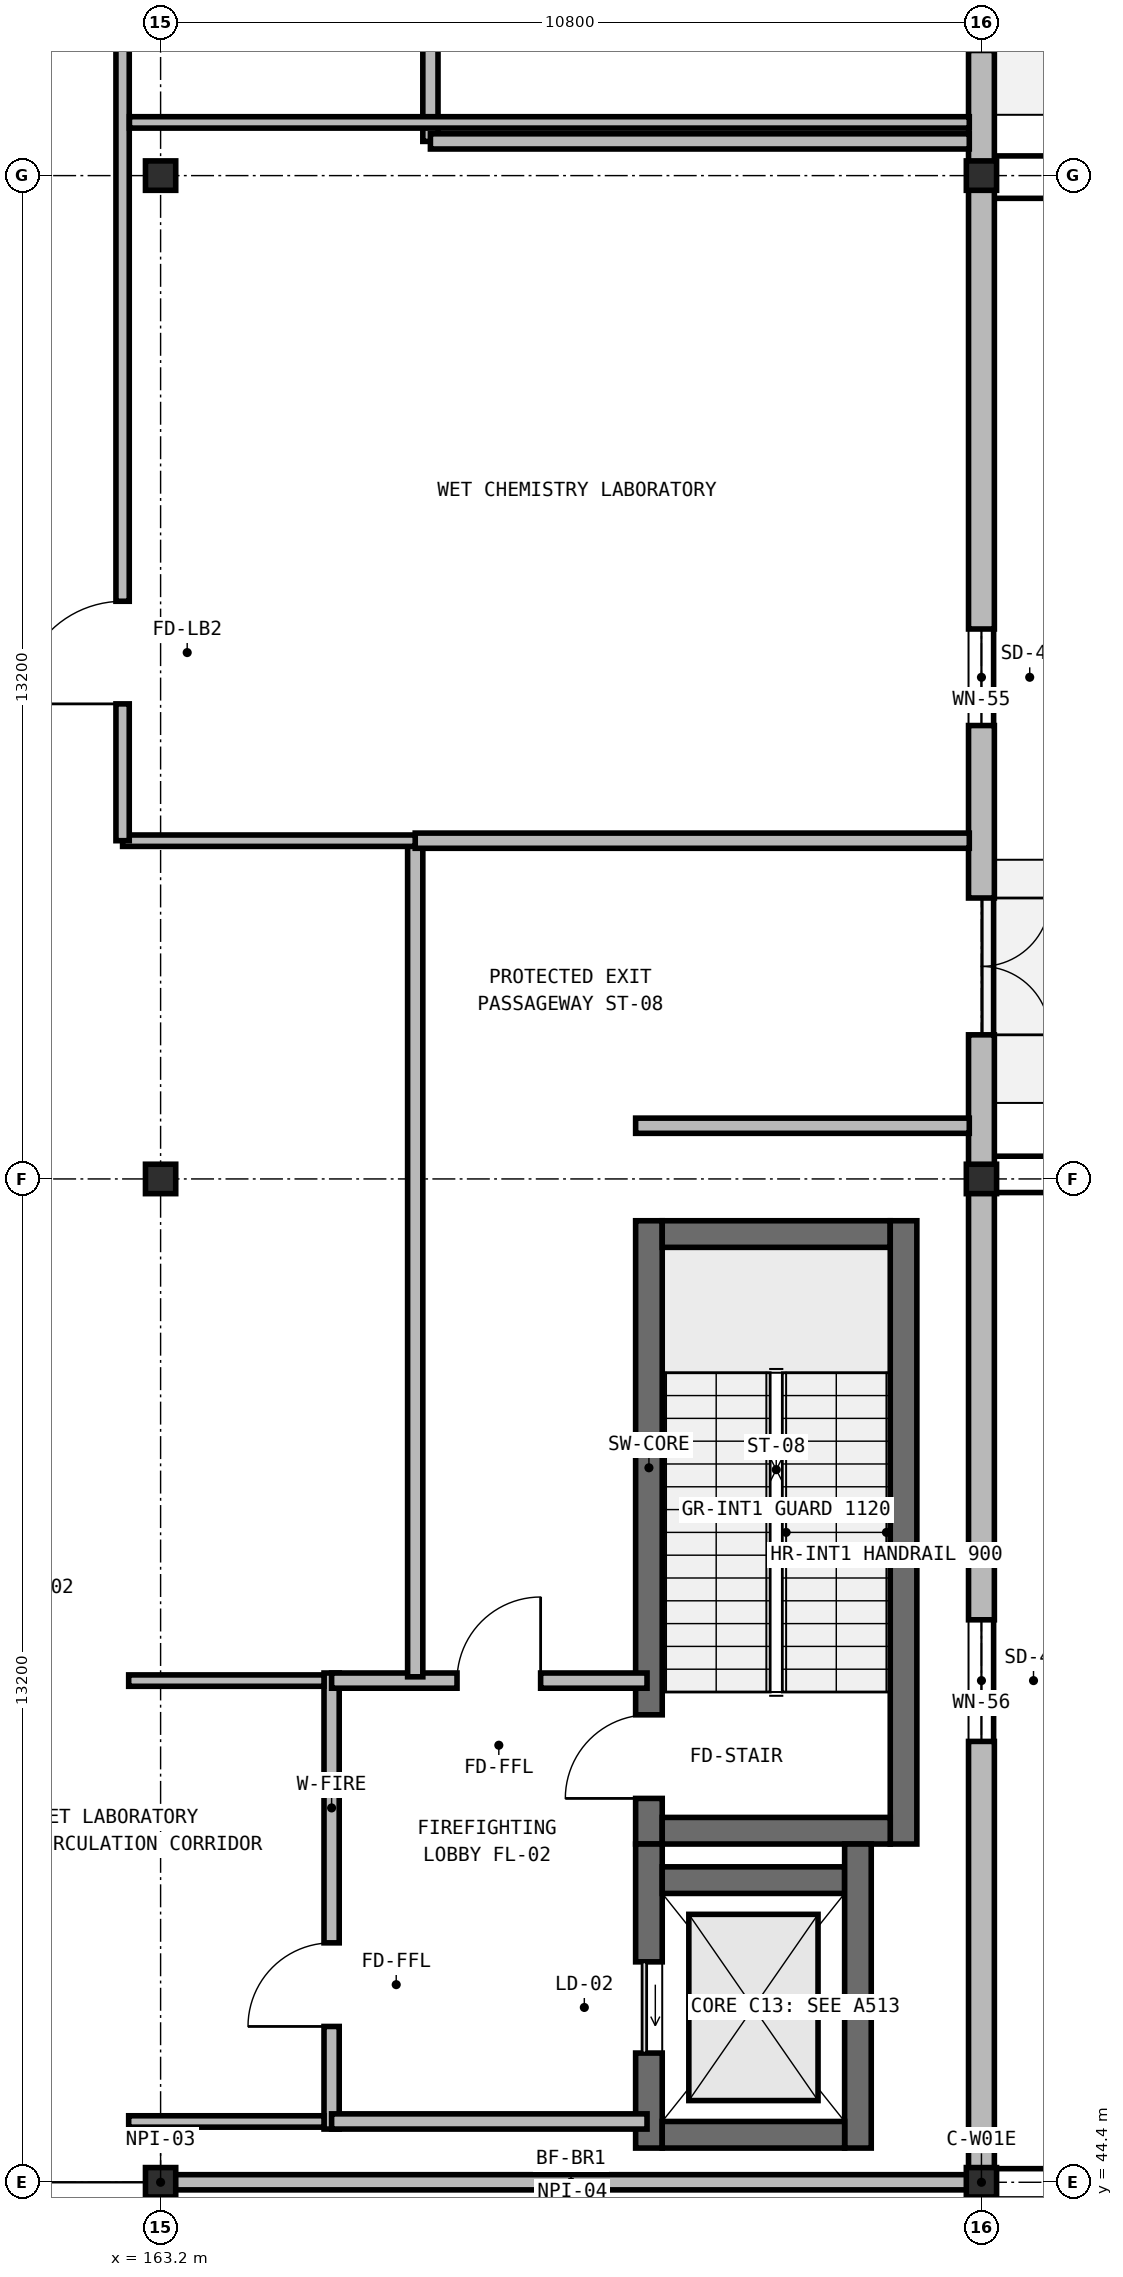
"""IFC4 building model, lengths in metres.
Left out: names, types, materials, properties, quantities, classifications, styles, units other than length and angle.
Written with IfcOpenShell. Run it as: python <this file> out.ifc"""

import sys

from ifc_helpers import new_model, si_unit, direction, frame, frame_2d, origin, origin_2d, place, context, subcontext, project, spatial, rectangle, i_section, extrude, element, fill, save


model = new_model("IFC4")
c1 = context("Model", 3, precision=1e-05, world=origin(), true_north=direction((0.0, 1.0)))
c2 = subcontext(c1, "Body", "Model", "MODEL_VIEW")
j1 = project(units=[si_unit("LENGTHUNIT", "METRE"), si_unit("PLANEANGLEUNIT", "RADIAN")], contexts=[c1])
p1 = place(None, origin())
s1 = spatial("IfcSite", under=j1, at=p1, CompositionType="ELEMENT")
p2 = place(p1, origin())
s2 = spatial("IfcBuilding", under=s1, at=p2, CompositionType="ELEMENT")
p3 = place(p2, origin())
s3 = spatial("IfcBuildingStorey", under=s2, at=p3, CompositionType="ELEMENT", Elevation=0.0)
p4 = place(p3, frame((169.625, 48.85, 0.0), z_axis=(0.0, 0.0, 1.0), x_axis=(0.0, 1.0, 0.0)))
e1 = element("IfcWall", 1, at=p4, inside=s3, PredefinedType="SHEAR", context=c2, shape_type="SweptSolid", body=[
    extrude(rectangle(XDim=8.2, YDim=0.35, at=frame_2d((4.1, 0.0))), origin(), (0.0, 0.0, 1.0), 5.25),
])
p5 = place(p4, frame((0.6, 0.0, 0.0)))
e2 = element("IfcOpeningElement", 2, at=p5, cuts=e1, PredefinedType="OPENING", context=c2, shape_type="SweptSolid", body=[
    extrude(rectangle(XDim=1.1, YDim=2.15, at=frame_2d((0.55, 1.075))), frame((0.0, 0.185, 0.0), z_axis=(0.0, -1.0, 0.0), x_axis=(1.0, 0.0, 0.0)), (0.0, 0.0, 1.0), 0.37),
])
p6 = place(p3, frame((169.8, 56.875, 0.0), z_axis=(0.0, 0.0, 1.0), x_axis=(1.0, 0.0, 0.0)))
e3 = element("IfcWall", 3, at=p6, inside=s3, PredefinedType="SHEAR", context=c2, shape_type="SweptSolid", body=[
    extrude(rectangle(XDim=3.0, YDim=0.35, at=frame_2d((1.5, 0.0))), origin(), (0.0, 0.0, 1.0), 5.25),
])
p7 = place(p3, frame((172.975, 57.05, 0.0), z_axis=(0.0, 0.0, 1.0), x_axis=(0.0, -1.0, 0.0)))
e4 = element("IfcWall", 4, at=p7, inside=s3, PredefinedType="SHEAR", context=c2, shape_type="SweptSolid", body=[
    extrude(rectangle(XDim=8.2, YDim=0.35, at=frame_2d((4.1, 0.0))), origin(), (0.0, 0.0, 1.0), 5.25),
])
p8 = place(p3, frame((172.8, 49.025, 0.0), z_axis=(0.0, 0.0, 1.0), x_axis=(-1.0, 0.0, 0.0)))
e5 = element("IfcWall", 5, at=p8, inside=s3, PredefinedType="SHEAR", context=c2, shape_type="SweptSolid", body=[
    extrude(rectangle(XDim=3.0, YDim=0.35, at=frame_2d((1.5, 0.0))), origin(), (0.0, 0.0, 1.0), 5.25),
])
p9 = place(p3, frame((169.625, 44.85, 0.0), z_axis=(0.0, 0.0, 1.0), x_axis=(0.0, 1.0, 0.0)))
e6 = element("IfcWall", 6, at=p9, inside=s3, PredefinedType="SHEAR", context=c2, shape_type="SweptSolid", body=[
    extrude(rectangle(XDim=4.0, YDim=0.35, at=frame_2d((2.0, 0.0))), origin(), (0.0, 0.0, 1.0), 5.25),
])
p10 = place(p9, frame((1.25, 0.0, 0.0)))
e7 = element("IfcOpeningElement", 7, at=p10, cuts=e6, PredefinedType="OPENING", context=c2, shape_type="SweptSolid", body=[
    extrude(rectangle(XDim=1.2, YDim=2.15, at=frame_2d((0.6, 1.075))), frame((0.0, 0.185, 0.0), z_axis=(0.0, -1.0, 0.0), x_axis=(1.0, 0.0, 0.0)), (0.0, 0.0, 1.0), 0.37),
])
p11 = place(p3, frame((169.8, 48.375, 0.0), z_axis=(0.0, 0.0, 1.0), x_axis=(1.0, 0.0, 0.0)))
e8 = element("IfcWall", 8, at=p11, inside=s3, PredefinedType="SHEAR", context=c2, shape_type="SweptSolid", body=[
    extrude(rectangle(XDim=2.4, YDim=0.35, at=frame_2d((1.2, 0.0))), origin(), (0.0, 0.0, 1.0), 5.25),
])
p12 = place(p3, frame((172.375, 48.85, 0.0), z_axis=(0.0, 0.0, 1.0), x_axis=(0.0, -1.0, 0.0)))
e9 = element("IfcWall", 9, at=p12, inside=s3, PredefinedType="SHEAR", context=c2, shape_type="SweptSolid", body=[
    extrude(rectangle(XDim=4.0, YDim=0.35, at=frame_2d((2.0, 0.0))), origin(), (0.0, 0.0, 1.0), 5.25),
])
p13 = place(p3, frame((172.2, 45.025, 0.0), z_axis=(0.0, 0.0, 1.0), x_axis=(-1.0, 0.0, 0.0)))
e10 = element("IfcWall", 10, at=p13, inside=s3, PredefinedType="SHEAR", context=c2, shape_type="SweptSolid", body=[
    extrude(rectangle(XDim=2.4, YDim=0.35, at=frame_2d((1.2, 0.0))), origin(), (0.0, 0.0, 1.0), 5.25),
])
for number, where, z_axis, x_axis in (
    (11, (163.2, 44.4, 0.0), (0.0, 0.0, 1.0), (1.0, 0.0, 0.0)),
    (12, (163.2, 57.6, 0.0), (0.0, 0.0, 1.0), (1.0, 0.0, 0.0)),
    (13, (163.2, 70.8, 0.0), (0.0, 0.0, 1.0), (1.0, 0.0, 0.0)),
    (14, (174.0, 44.4, 0.0), (0.0, 0.0, 1.0), (1.0, 0.0, 0.0)),
    (15, (174.0, 57.6, 0.0), (0.0, 0.0, 1.0), (1.0, 0.0, 0.0)),
    (16, (174.0, 70.8, 0.0), (0.0, 0.0, 1.0), (1.0, 0.0, 0.0)),
):
    element("IfcColumn", number, at=place(p3, frame(where, z_axis=z_axis, x_axis=x_axis)), inside=s3, PredefinedType="COLUMN", context=c2, shape_type="SweptSolid", body=[
        extrude(i_section(OverallWidth=0.398, OverallDepth=0.387, WebThickness=0.024, FlangeThickness=0.039, at=origin_2d()), origin(), (0.0, 0.0, 1.0), 5.25),
    ])
p14 = place(p3, frame((174.0, 83.996, 0.0), z_axis=(0.0, 0.0, 1.0), x_axis=(0.0, -1.0, 0.0)))
e17 = element("IfcWall", 17, at=p14, inside=s3, PredefinedType="SOLIDWALL", context=c2, shape_type="SweptSolid", body=[
    extrude(rectangle(XDim=13.192, YDim=0.34, at=frame_2d((6.596, 0.0))), origin(), (0.0, 0.0, 1.0), 4.516),
])
p15 = place(p14, frame((9.75, 0.0, 0.0)))
e18 = element("IfcOpeningElement", 18, at=p15, cuts=e17, PredefinedType="OPENING", context=c2, shape_type="SweptSolid", body=[
    extrude(rectangle(XDim=1.8, YDim=2.25, at=frame_2d((0.9, 1.125))), frame((0.0, 0.18, 0.0), z_axis=(0.0, -1.0, 0.0), x_axis=(1.0, 0.0, 0.0)), (0.0, 0.0, 1.0), 0.36),
])
p16 = place(p14, frame((5.246, 0.0, 0.95)))
e19 = element("IfcOpeningElement", 19, at=p16, cuts=e17, PredefinedType="OPENING", context=c2, shape_type="SweptSolid", body=[
    extrude(rectangle(XDim=2.7, YDim=1.97, at=frame_2d((1.35, 0.985))), frame((0.0, 0.18, 0.0), z_axis=(0.0, -1.0, 0.0), x_axis=(1.0, 0.0, 0.0)), (0.0, 0.0, 1.0), 0.36),
])
p17 = place(p3, frame((174.0, 70.796, 0.0), z_axis=(0.0, 0.0, 1.0), x_axis=(0.0, -1.0, 0.0)))
e20 = element("IfcWall", 20, at=p17, inside=s3, PredefinedType="SOLIDWALL", context=c2, shape_type="SweptSolid", body=[
    extrude(rectangle(XDim=13.192, YDim=0.34, at=frame_2d((6.596, 0.0))), origin(), (0.0, 0.0, 1.0), 4.516),
])
p18 = place(p17, frame((9.5, 0.0, 0.0)))
e21 = element("IfcOpeningElement", 21, at=p18, cuts=e20, PredefinedType="OPENING", context=c2, shape_type="SweptSolid", body=[
    extrude(rectangle(XDim=1.8, YDim=2.25, at=frame_2d((0.9, 1.125))), frame((0.0, 0.18, 0.0), z_axis=(0.0, -1.0, 0.0), x_axis=(1.0, 0.0, 0.0)), (0.0, 0.0, 1.0), 0.36),
])
p19 = place(p17, frame((5.961, 0.0, 0.95)))
e22 = element("IfcOpeningElement", 22, at=p19, cuts=e20, PredefinedType="OPENING", context=c2, shape_type="SweptSolid", body=[
    extrude(rectangle(XDim=1.27, YDim=1.89, at=frame_2d((0.635, 0.945))), frame((0.0, 0.18, 0.0), z_axis=(0.0, -1.0, 0.0), x_axis=(1.0, 0.0, 0.0)), (0.0, 0.0, 1.0), 0.36),
])
p20 = place(p3, frame((174.0, 57.596, 0.0), z_axis=(0.0, 0.0, 1.0), x_axis=(0.0, -1.0, 0.0)))
e23 = element("IfcWall", 23, at=p20, inside=s3, PredefinedType="SOLIDWALL", context=c2, shape_type="SweptSolid", body=[
    extrude(rectangle(XDim=13.192, YDim=0.34, at=frame_2d((6.596, 0.0))), origin(), (0.0, 0.0, 1.0), 4.516),
])
p21 = place(p20, frame((5.796, 0.0, 0.95)))
e24 = element("IfcOpeningElement", 24, at=p21, cuts=e23, PredefinedType="OPENING", context=c2, shape_type="SweptSolid", body=[
    extrude(rectangle(XDim=1.6, YDim=1.81, at=frame_2d((0.8, 0.905))), frame((0.0, 0.18, 0.0), z_axis=(0.0, -1.0, 0.0), x_axis=(1.0, 0.0, 0.0)), (0.0, 0.0, 1.0), 0.36),
])
p22 = place(p3, frame((174.0, 44.396, 0.0), z_axis=(0.0, 0.0, 1.0), x_axis=(0.0, -1.0, 0.0)))
e25 = element("IfcWall", 25, at=p22, inside=s3, PredefinedType="SOLIDWALL", context=c2, shape_type="SweptSolid", body=[
    extrude(rectangle(XDim=9.592, YDim=0.34, at=frame_2d((4.796, 0.0))), origin(), (0.0, 0.0, 1.0), 4.584),
])
p23 = place(p22, frame((3.831, 0.0, 0.95)))
e26 = element("IfcOpeningElement", 26, at=p23, cuts=e25, PredefinedType="OPENING", context=c2, shape_type="SweptSolid", body=[
    extrude(rectangle(XDim=1.93, YDim=1.73, at=frame_2d((0.965, 0.865))), frame((0.0, 0.18, 0.0), z_axis=(0.0, -1.0, 0.0), x_axis=(1.0, 0.0, 0.0)), (0.0, 0.0, 1.0), 0.36),
])
p24 = place(p3, frame((163.36, 44.4, 0.0), z_axis=(0.0, 0.0, 1.0), x_axis=(1.0, 0.0, 0.0)))
e27 = element("IfcWall", 27, at=p24, inside=s3, PredefinedType="SOLIDWALL", context=c2, shape_type="SweptSolid", body=[
    extrude(rectangle(XDim=10.48, YDim=0.2, at=frame_2d((5.24, 0.0))), origin(), (0.0, 0.0, 1.0), 4.438),
])
p25 = place(p3, frame((165.45, 45.1, 0.0), z_axis=(0.0, 0.0, 1.0), x_axis=(0.0, 1.0, 0.0)))
e28 = element("IfcWall", 28, at=p25, inside=s3, PredefinedType="SOLIDWALL", context=c2, shape_type="SweptSolid", body=[
    extrude(rectangle(XDim=6.0, YDim=0.2, at=frame_2d((3.0, 0.0))), origin(), (0.0, 0.0, 1.0), 4.93),
])
p26 = place(p25, frame((1.35, 0.0, 0.0)))
e29 = element("IfcOpeningElement", 29, at=p26, cuts=e28, PredefinedType="OPENING", context=c2, shape_type="SweptSolid", body=[
    extrude(rectangle(XDim=1.1, YDim=2.15, at=frame_2d((0.55, 1.075))), frame((0.0, 0.11, 0.0), z_axis=(0.0, -1.0, 0.0), x_axis=(1.0, 0.0, 0.0)), (0.0, 0.0, 1.0), 0.22),
])
p27 = place(p3, frame((165.45, 45.2, 0.0), z_axis=(0.0, 0.0, 1.0), x_axis=(1.0, 0.0, 0.0)))
e30 = element("IfcWall", 30, at=p27, inside=s3, PredefinedType="SOLIDWALL", context=c2, shape_type="SweptSolid", body=[
    extrude(rectangle(XDim=4.15, YDim=0.2, at=frame_2d((2.075, 0.0))), origin(), (0.0, 0.0, 1.0), 4.93),
])
p28 = place(p3, frame((165.45, 51.0, 0.0), z_axis=(0.0, 0.0, 1.0), x_axis=(1.0, 0.0, 0.0)))
e31 = element("IfcWall", 31, at=p28, inside=s3, PredefinedType="SOLIDWALL", context=c2, shape_type="SweptSolid", body=[
    extrude(rectangle(XDim=4.15, YDim=0.2, at=frame_2d((2.075, 0.0))), origin(), (0.0, 0.0, 1.0), 4.93),
])
p29 = place(p28, frame((1.65, 0.0, 0.0)))
e32 = element("IfcOpeningElement", 32, at=p29, cuts=e31, PredefinedType="OPENING", context=c2, shape_type="SweptSolid", body=[
    extrude(rectangle(XDim=1.1, YDim=2.15, at=frame_2d((0.55, 1.075))), frame((0.0, 0.11, 0.0), z_axis=(0.0, -1.0, 0.0), x_axis=(1.0, 0.0, 0.0)), (0.0, 0.0, 1.0), 0.22),
])
p30 = place(p3, frame((166.55, 51.05, 0.0), z_axis=(0.0, 0.0, 1.0), x_axis=(0.0, 1.0, 0.0)))
e33 = element("IfcWall", 33, at=p30, inside=s3, PredefinedType="SOLIDWALL", context=c2, shape_type="SweptSolid", body=[
    extrude(rectangle(XDim=11.0, YDim=0.2, at=frame_2d((5.5, 0.0))), origin(), (0.0, 0.0, 1.0), 4.93),
])
p31 = place(p3, frame((166.55, 62.05, 0.0), z_axis=(0.0, 0.0, 1.0), x_axis=(1.0, 0.0, 0.0)))
e34 = element("IfcWall", 34, at=p31, inside=s3, PredefinedType="SOLIDWALL", context=c2, shape_type="SweptSolid", body=[
    extrude(rectangle(XDim=7.29, YDim=0.2, at=frame_2d((3.645, 0.0))), origin(), (0.0, 0.0, 1.0), 4.93),
])
p32 = place(p3, frame((169.45, 58.3, 0.0), z_axis=(0.0, 0.0, 1.0), x_axis=(1.0, 0.0, 0.0)))
e35 = element("IfcWall", 35, at=p32, inside=s3, PredefinedType="SOLIDWALL", context=c2, shape_type="SweptSolid", body=[
    extrude(rectangle(XDim=4.39, YDim=0.2, at=frame_2d((2.195, 0.0))), origin(), (0.0, 0.0, 1.0), 4.93),
])
p33 = place(p3, frame((166.75, 71.25, 0.0), z_axis=(0.0, 0.0, 1.0), x_axis=(0.0, 1.0, 0.0)))
e36 = element("IfcWall", 36, at=p33, inside=s3, PredefinedType="SOLIDWALL", context=c2, shape_type="SweptSolid", body=[
    extrude(rectangle(XDim=6.0, YDim=0.2, at=frame_2d((3.0, 0.0))), origin(), (0.0, 0.0, 1.0), 4.93),
])
p34 = place(p33, frame((3.9, 0.0, 0.0)))
e37 = element("IfcOpeningElement", 37, at=p34, cuts=e36, PredefinedType="OPENING", context=c2, shape_type="SweptSolid", body=[
    extrude(rectangle(XDim=1.1, YDim=2.15, at=frame_2d((0.55, 1.075))), frame((0.0, 0.11, 0.0), z_axis=(0.0, -1.0, 0.0), x_axis=(1.0, 0.0, 0.0)), (0.0, 0.0, 1.0), 0.22),
])
p35 = place(p3, frame((166.75, 71.25, 0.0), z_axis=(0.0, 0.0, 1.0), x_axis=(1.0, 0.0, 0.0)))
e38 = element("IfcWall", 38, at=p35, inside=s3, PredefinedType="SOLIDWALL", context=c2, shape_type="SweptSolid", body=[
    extrude(rectangle(XDim=7.09, YDim=0.2, at=frame_2d((3.545, 0.0))), origin(), (0.0, 0.0, 1.0), 4.93),
])
p36 = place(p3, frame((162.7, 62.05, 0.0), z_axis=(0.0, 0.0, 1.0), x_axis=(1.0, 0.0, 0.0)))
e39 = element("IfcWall", 39, at=p36, inside=s3, PredefinedType="PARTITIONING", context=c2, shape_type="SweptSolid", body=[
    extrude(rectangle(XDim=3.85, YDim=0.15, at=frame_2d((1.925, 0.0))), origin(), (0.0, 0.0, 1.0), 4.93),
])
p37 = place(p3, frame((162.7, 62.05, 0.0), z_axis=(0.0, 0.0, 1.0), x_axis=(0.0, 1.0, 0.0)))
e40 = element("IfcWall", 40, at=p37, inside=s3, PredefinedType="PARTITIONING", context=c2, shape_type="SweptSolid", body=[
    extrude(rectangle(XDim=12.7, YDim=0.175, at=frame_2d((6.35, 0.0))), origin(), (0.0, 0.0, 1.0), 4.93),
])
p38 = place(p37, frame((1.8, 0.0, 0.0)))
e41 = element("IfcOpeningElement", 41, at=p38, cuts=e40, PredefinedType="OPENING", context=c2, shape_type="SweptSolid", body=[
    extrude(rectangle(XDim=1.35, YDim=2.2, at=frame_2d((0.675, 1.1))), frame((0.0, 0.097, 0.0), z_axis=(0.0, -1.0, 0.0), x_axis=(1.0, 0.0, 0.0)), (0.0, 0.0, 1.0), 0.195),
])
p39 = place(p3, frame((162.79, 71.5, 0.0), z_axis=(0.0, 0.0, 1.0), x_axis=(1.0, 0.0, 0.0)))
e42 = element("IfcWall", 42, at=p39, inside=s3, PredefinedType="PARTITIONING", context=c2, shape_type="SweptSolid", body=[
    extrude(rectangle(XDim=11.05, YDim=0.15, at=frame_2d((5.525, 0.0))), origin(), (0.0, 0.0, 1.0), 4.93),
])
for number, where, z_axis, x_axis in (
    (43, (162.78, 45.2, 0.0), (0.0, 0.0, 1.0), (1.0, 0.0, 0.0)),
    (44, (162.78, 51.0, 0.0), (0.0, 0.0, 1.0), (1.0, 0.0, 0.0)),
):
    element("IfcWall", number, at=place(p3, frame(where, z_axis=z_axis, x_axis=x_axis)), inside=s3, PredefinedType="PARTITIONING", context=c2, shape_type="SweptSolid", body=[
        extrude(rectangle(XDim=2.57, YDim=0.15, at=frame_2d((1.285, 0.0))), origin(), (0.0, 0.0, 1.0), 4.93),
    ])
p40 = place(p18, origin())
e45 = element("IfcDoor", 45, at=p40, inside=s3, OperationType="DOUBLE_DOOR_SINGLE_SWING", PredefinedType="DOOR", context=c2, shape_type="SweptSolid", body=[
    extrude(rectangle(XDim=1.8, YDim=2.25, at=frame_2d((0.9, 1.125))), frame((0.0, 0.025, 0.0), z_axis=(0.0, -1.0, 0.0), x_axis=(1.0, 0.0, 0.0)), (0.0, 0.0, 1.0), 0.05),
])
fill(e21, e45)
p41 = place(p19, origin())
e46 = element("IfcWindow", 46, at=p41, inside=s3, PartitioningType="SINGLE_PANEL", PredefinedType="WINDOW", context=c2, shape_type="SweptSolid", body=[
    extrude(rectangle(XDim=1.27, YDim=1.89, at=frame_2d((0.635, 0.945))), frame((0.0, 0.03, 0.0), z_axis=(0.0, -1.0, 0.0), x_axis=(1.0, 0.0, 0.0)), (0.0, 0.0, 1.0), 0.06),
])
fill(e22, e46)
p42 = place(p21, origin())
e47 = element("IfcWindow", 47, at=p42, inside=s3, PartitioningType="SINGLE_PANEL", PredefinedType="WINDOW", context=c2, shape_type="SweptSolid", body=[
    extrude(rectangle(XDim=1.6, YDim=1.81, at=frame_2d((0.8, 0.905))), frame((0.0, 0.03, 0.0), z_axis=(0.0, -1.0, 0.0), x_axis=(1.0, 0.0, 0.0)), (0.0, 0.0, 1.0), 0.06),
])
fill(e24, e47)
p43 = place(p5, origin())
e48 = element("IfcDoor", 48, at=p43, inside=s3, OperationType="SINGLE_SWING_LEFT", PredefinedType="DOOR", context=c2, shape_type="SweptSolid", body=[
    extrude(rectangle(XDim=1.1, YDim=2.15, at=frame_2d((0.55, 1.075))), frame((0.0, 0.025, 0.0), z_axis=(0.0, -1.0, 0.0), x_axis=(1.0, 0.0, 0.0)), (0.0, 0.0, 1.0), 0.05),
])
fill(e2, e48)
p44 = place(p10, origin())
e49 = element("IfcDoor", 49, at=p44, inside=s3, OperationType="SLIDING_TO_LEFT", PredefinedType="USERDEFINED", context=c2, shape_type="SweptSolid", body=[
    extrude(rectangle(XDim=1.2, YDim=2.15, at=frame_2d((0.6, 1.075))), frame((0.0, 0.025, 0.0), z_axis=(0.0, -1.0, 0.0), x_axis=(1.0, 0.0, 0.0)), (0.0, 0.0, 1.0), 0.05),
])
fill(e7, e49)
p45 = place(p26, origin())
e50 = element("IfcDoor", 50, at=p45, inside=s3, OperationType="SINGLE_SWING_LEFT", PredefinedType="DOOR", context=c2, shape_type="SweptSolid", body=[
    extrude(rectangle(XDim=1.1, YDim=2.15, at=frame_2d((0.55, 1.075))), frame((0.0, 0.025, 0.0), z_axis=(0.0, -1.0, 0.0), x_axis=(1.0, 0.0, 0.0)), (0.0, 0.0, 1.0), 0.05),
])
fill(e29, e50)
p46 = place(p29, origin())
e51 = element("IfcDoor", 51, at=p46, inside=s3, OperationType="SINGLE_SWING_RIGHT", PredefinedType="DOOR", context=c2, shape_type="SweptSolid", body=[
    extrude(rectangle(XDim=1.1, YDim=2.15, at=frame_2d((0.55, 1.075))), frame((0.0, 0.025, 0.0), z_axis=(0.0, -1.0, 0.0), x_axis=(1.0, 0.0, 0.0)), (0.0, 0.0, 1.0), 0.05),
])
fill(e32, e51)
p47 = place(p38, origin())
e52 = element("IfcDoor", 52, at=p47, inside=s3, OperationType="SINGLE_SWING_LEFT", PredefinedType="DOOR", context=c2, shape_type="SweptSolid", body=[
    extrude(rectangle(XDim=1.35, YDim=2.2, at=frame_2d((0.675, 1.1))), frame((0.0, 0.025, 0.0), z_axis=(0.0, -1.0, 0.0), x_axis=(1.0, 0.0, 0.0)), (0.0, 0.0, 1.0), 0.05),
])
fill(e41, e52)
save(model, sys.argv[1])
